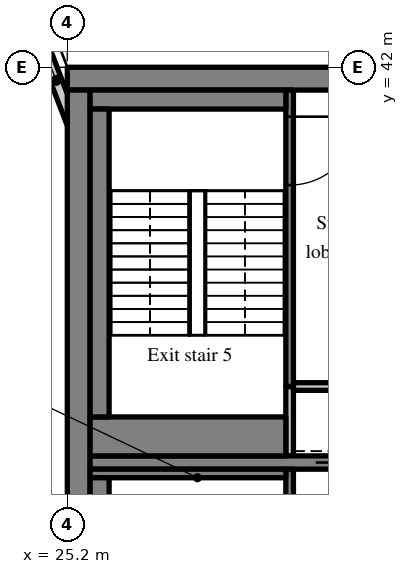
"""IFC4 building model, lengths in metres.
Left out: names, types, materials, properties, quantities, classifications, styles, units other than length and angle.
Written with IfcOpenShell. Run it as: python <this file> out.ifc"""

import sys

from ifc_helpers import new_model, si_unit, direction, frame, frame_2d, origin, place, context, subcontext, project, spatial, rectangle, extrude, source, transform, mapped, element, fill, save


model = new_model("IFC4")
c1 = context("Model", 3, precision=1e-05, world=origin(), true_north=direction((0.0, 1.0)))
c2 = subcontext(c1, "Body", "Model", "MODEL_VIEW")
j1 = project(units=[si_unit("LENGTHUNIT", "METRE"), si_unit("PLANEANGLEUNIT", "RADIAN")], contexts=[c1])
p1 = place(None, origin())
s1 = spatial("IfcSite", under=j1, at=p1, CompositionType="ELEMENT")
p2 = place(p1, origin())
s2 = spatial("IfcBuilding", under=s1, at=p2, CompositionType="ELEMENT")
p3 = place(p2, frame((0.0, 0.0, 225.7)))
s3 = spatial("IfcBuildingStorey", under=s2, at=p3, CompositionType="ELEMENT", Elevation=225.7)
m1 = source(origin(), c2, "Body", "SweptSolid", [
    extrude(rectangle(XDim=50.4, YDim=0.6, at=frame_2d((25.2, 0.0))), origin(), (0.0, 0.0, 1.0), 3.62),
])
p4 = place(p3, frame((25.2, 41.7, 0.0), z_axis=(0.0, 0.0, 1.0), x_axis=(1.0, 0.0, 0.0)))
e1 = element("IfcWall", 1, at=p4, inside=s3, PredefinedType="SHEAR", context=c2, shape_type="MappedRepresentation", body=[
    mapped(m1, transform((0.0, 0.0, 0.0), scale=1.0)),
])
m2 = source(origin(), c2, "Body", "SweptSolid", [
    extrude(rectangle(XDim=18.8, YDim=0.6, at=frame_2d((9.4, 0.0))), origin(), (0.0, 0.0, 1.0), 3.62),
])
p5 = place(p3, frame((25.5, 22.6, 0.0), z_axis=(0.0, 0.0, 1.0), x_axis=(0.0, 1.0, 0.0)))
e2 = element("IfcWall", 2, at=p5, inside=s3, PredefinedType="SHEAR", context=c2, shape_type="MappedRepresentation", body=[
    mapped(m2, transform((0.0, 0.0, 0.0), scale=1.0)),
])
m3 = source(origin(), c2, "Body", "SweptSolid", [
    extrude(rectangle(XDim=7.625, YDim=0.35, at=frame_2d((3.812, 0.0))), origin(), (0.0, 0.0, 1.0), 3.62),
])
p6 = place(p3, frame((25.8, 31.6, 0.0), z_axis=(0.0, 0.0, 1.0), x_axis=(1.0, 0.0, 0.0)))
e3 = element("IfcWall", 3, at=p6, inside=s3, PredefinedType="SHEAR", context=c2, shape_type="MappedRepresentation", body=[
    mapped(m3, transform((0.0, 0.0, 0.0), scale=1.0)),
])
m4 = source(origin(), c2, "Body", "SweptSolid", [
    extrude(rectangle(XDim=1.1, YDim=2.1, at=frame_2d((0.55, 1.05))), frame((0.0, 0.185, 0.0), z_axis=(0.0, -1.0, 0.0), x_axis=(1.0, 0.0, 0.0)), (0.0, 0.0, 1.0), 0.37),
])
p7 = place(p6, frame((5.938, 0.0, 0.0)))
e4 = element("IfcOpeningElement", 4, at=p7, cuts=e3, PredefinedType="OPENING", context=c2, shape_type="MappedRepresentation", body=[
    mapped(m4, transform((0.0, 0.0, 0.0), scale=1.0)),
])
m5 = source(origin(), c2, "Body", "SweptSolid", [
    extrude(rectangle(XDim=3.559, YDim=0.3, at=frame_2d((1.78, 0.0))), origin(), (0.0, 0.0, 1.0), 3.62),
])
p8 = place(p3, frame((25.55, 39.969, 0.0), z_axis=(0.0, 0.0, 1.0), x_axis=(-0.35779745313, 0.933799219604, 0.0)))
e5 = element("IfcWall", 5, at=p8, inside=s3, PredefinedType="SOLIDWALL", context=c2, shape_type="MappedRepresentation", body=[
    mapped(m5, transform((0.0, 0.0, 0.0), scale=1.0)),
])
m6 = source(origin(), c2, "Body", "SweptSolid", [
    extrude(rectangle(XDim=1.5, YDim=2.0, at=frame_2d((0.75, 1.0))), frame((0.0, 0.16, 0.0), z_axis=(0.0, -1.0, 0.0), x_axis=(1.0, 0.0, 0.0)), (0.0, 0.0, 1.0), 0.32),
])
p9 = place(p8, frame((1.903, 0.0, 0.9)))
e6 = element("IfcOpeningElement", 6, at=p9, cuts=e5, PredefinedType="OPENING", context=c2, shape_type="MappedRepresentation", body=[
    mapped(m6, transform((0.0, 0.0, 0.0), scale=1.0)),
])
m7 = source(origin(), c2, "Body", "SweptSolid", [
    extrude(rectangle(XDim=8.825, YDim=0.2, at=frame_2d((4.413, 0.0))), origin(), (0.0, 0.0, 1.0), 3.62),
])
p10 = place(p3, frame((31.05, 22.6, 0.0), z_axis=(0.0, 0.0, 1.0), x_axis=(0.0, 1.0, 0.0)))
e7 = element("IfcWall", 7, at=p10, inside=s3, PredefinedType="SOLIDWALL", context=c2, shape_type="MappedRepresentation", body=[
    mapped(m7, transform((0.0, 0.0, 0.0), scale=1.0)),
])
m8 = source(origin(), c2, "Body", "SweptSolid", [
    extrude(rectangle(XDim=1.2, YDim=2.1, at=frame_2d((0.6, 1.05))), frame((0.0, 0.11, 0.0), z_axis=(0.0, -1.0, 0.0), x_axis=(1.0, 0.0, 0.0)), (0.0, 0.0, 1.0), 0.22),
])
p11 = place(p10, frame((6.9, 0.0, 0.0)))
e8 = element("IfcOpeningElement", 8, at=p11, cuts=e7, PredefinedType="OPENING", context=c2, shape_type="MappedRepresentation", body=[
    mapped(m8, transform((0.0, 0.0, 0.0), scale=1.0)),
])
m9 = source(origin(), c2, "Body", "SweptSolid", [
    extrude(rectangle(XDim=1.825, YDim=0.2, at=frame_2d((0.913, 0.0))), origin(), (0.0, 0.0, 1.0), 3.62),
])
p12 = place(p3, frame((31.05, 31.775, 0.0), z_axis=(0.0, 0.0, 1.0), x_axis=(0.0, 1.0, 0.0)))
e9 = element("IfcWall", 9, at=p12, inside=s3, PredefinedType="SOLIDWALL", context=c2, shape_type="MappedRepresentation", body=[
    mapped(m9, transform((0.0, 0.0, 0.0), scale=1.0)),
])
m10 = source(origin(), c2, "Body", "SweptSolid", [
    extrude(rectangle(XDim=2.275, YDim=0.2, at=frame_2d((1.138, 0.0))), origin(), (0.0, 0.0, 1.0), 3.62),
])
p13 = place(p3, frame((31.15, 33.6, 0.0), z_axis=(0.0, 0.0, 1.0), x_axis=(1.0, 0.0, 0.0)))
e10 = element("IfcWall", 10, at=p13, inside=s3, PredefinedType="SOLIDWALL", context=c2, shape_type="MappedRepresentation", body=[
    mapped(m10, transform((0.0, 0.0, 0.0), scale=1.0)),
])
m11 = source(origin(), c2, "Body", "SweptSolid", [
    extrude(rectangle(XDim=7.8, YDim=0.2, at=frame_2d((3.9, 0.0))), origin(), (0.0, 0.0, 1.0), 3.62),
])
p14 = place(p3, frame((31.05, 33.6, 0.0), z_axis=(0.0, 0.0, 1.0), x_axis=(0.0, 1.0, 0.0)))
e11 = element("IfcWall", 11, at=p14, inside=s3, PredefinedType="SOLIDWALL", context=c2, shape_type="MappedRepresentation", body=[
    mapped(m11, transform((0.0, 0.0, 0.0), scale=1.0)),
])
m12 = source(origin(), c2, "Body", "SweptSolid", [
    extrude(rectangle(XDim=1.8, YDim=2.1, at=frame_2d((0.9, 1.05))), frame((0.0, 0.11, 0.0), z_axis=(0.0, -1.0, 0.0), x_axis=(1.0, 0.0, 0.0)), (0.0, 0.0, 1.0), 0.22),
])
p15 = place(p14, frame((5.3, 0.0, 0.0)))
e12 = element("IfcOpeningElement", 12, at=p15, cuts=e11, PredefinedType="OPENING", context=c2, shape_type="MappedRepresentation", body=[
    mapped(m12, transform((0.0, 0.0, 0.0), scale=1.0)),
])
m13 = source(origin(), c2, "Body", "SweptSolid", [
    extrude(rectangle(XDim=5.15, YDim=0.225, at=frame_2d((2.575, 0.0))), origin(), (0.0, 0.0, 1.0), 3.62),
])
p16 = place(p3, frame((25.8, 31.312, 0.0), z_axis=(0.0, 0.0, 1.0), x_axis=(1.0, 0.0, 0.0)))
e13 = element("IfcWall", 13, at=p16, inside=s3, PredefinedType="SOLIDWALL", context=c2, shape_type="MappedRepresentation", body=[
    mapped(m13, transform((0.0, 0.0, 0.0), scale=1.0)),
])
m14 = source(origin(), c2, "Body", "SweptSolid", [
    extrude(rectangle(XDim=8.1, YDim=0.5, at=frame_2d((4.05, 0.0))), origin(), (0.0, 0.0, 1.0), 3.62),
])
p17 = place(p3, frame((26.05, 23.1, 0.0), z_axis=(0.0, 0.0, 1.0), x_axis=(0.0, 1.0, 0.0)))
e14 = element("IfcWall", 14, at=p17, inside=s3, PredefinedType="SOLIDWALL", context=c2, shape_type="MappedRepresentation", body=[
    mapped(m14, transform((0.0, 0.0, 0.0), scale=1.0)),
])
m15 = source(origin(), c2, "Body", "SweptSolid", [
    extrude(rectangle(XDim=5.15, YDim=0.5, at=frame_2d((2.575, 0.0))), origin(), (0.0, 0.0, 1.0), 3.62),
])
p18 = place(p3, frame((25.8, 41.15, 0.0), z_axis=(0.0, 0.0, 1.0), x_axis=(1.0, 0.0, 0.0)))
e15 = element("IfcWall", 15, at=p18, inside=s3, PredefinedType="SOLIDWALL", context=c2, shape_type="MappedRepresentation", body=[
    mapped(m15, transform((0.0, 0.0, 0.0), scale=1.0)),
])
m16 = source(origin(), c2, "Body", "SweptSolid", [
    extrude(rectangle(XDim=5.15, YDim=1.025, at=frame_2d((2.575, 0.0))), origin(), (0.0, 0.0, 1.0), 3.62),
])
p19 = place(p3, frame((25.8, 32.287, 0.0), z_axis=(0.0, 0.0, 1.0), x_axis=(1.0, 0.0, 0.0)))
e16 = element("IfcWall", 16, at=p19, inside=s3, PredefinedType="SOLIDWALL", context=c2, shape_type="MappedRepresentation", body=[
    mapped(m16, transform((0.0, 0.0, 0.0), scale=1.0)),
])
p20 = place(p3, frame((26.05, 32.8, 0.0), z_axis=(0.0, 0.0, 1.0), x_axis=(0.0, 1.0, 0.0)))
e17 = element("IfcWall", 17, at=p20, inside=s3, PredefinedType="SOLIDWALL", context=c2, shape_type="MappedRepresentation", body=[
    mapped(m14, transform((0.0, 0.0, 0.0), scale=1.0)),
])
m17 = source(origin(), c2, "Body", "SweptSolid", [
    extrude(rectangle(XDim=1.5, YDim=2.0, at=frame_2d((0.75, 1.0))), frame((0.0, 0.03, 0.0), z_axis=(0.0, -1.0, 0.0), x_axis=(1.0, 0.0, 0.0)), (0.0, 0.0, 1.0), 0.06),
])
p21 = place(p9, origin())
e18 = element("IfcWindow", 18, at=p21, inside=s3, PartitioningType="SINGLE_PANEL", PredefinedType="WINDOW", context=c2, shape_type="MappedRepresentation", body=[
    mapped(m17, transform((0.0, 0.0, 0.0), scale=1.0)),
])
fill(e6, e18)
m18 = source(origin(), c2, "Body", "SweptSolid", [
    extrude(rectangle(XDim=1.1, YDim=2.1, at=frame_2d((0.55, 1.05))), frame((0.0, 0.025, 0.0), z_axis=(0.0, -1.0, 0.0), x_axis=(1.0, 0.0, 0.0)), (0.0, 0.0, 1.0), 0.05),
])
p22 = place(p7, origin())
e19 = element("IfcDoor", 19, at=p22, inside=s3, OperationType="SLIDING_TO_LEFT", PredefinedType="DOOR", context=c2, shape_type="MappedRepresentation", body=[
    mapped(m18, transform((0.0, 0.0, 0.0), scale=1.0)),
])
fill(e4, e19)
m19 = source(origin(), c2, "Body", "SweptSolid", [
    extrude(rectangle(XDim=1.8, YDim=2.1, at=frame_2d((0.9, 1.05))), frame((0.0, 0.025, 0.0), z_axis=(0.0, -1.0, 0.0), x_axis=(1.0, 0.0, 0.0)), (0.0, 0.0, 1.0), 0.05),
])
p23 = place(p15, origin())
e20 = element("IfcDoor", 20, at=p23, inside=s3, OperationType="SINGLE_SWING_RIGHT", PredefinedType="DOOR", context=c2, shape_type="MappedRepresentation", body=[
    mapped(m19, transform((0.0, 0.0, 0.0), scale=1.0)),
])
fill(e12, e20)
save(model, sys.argv[1])
